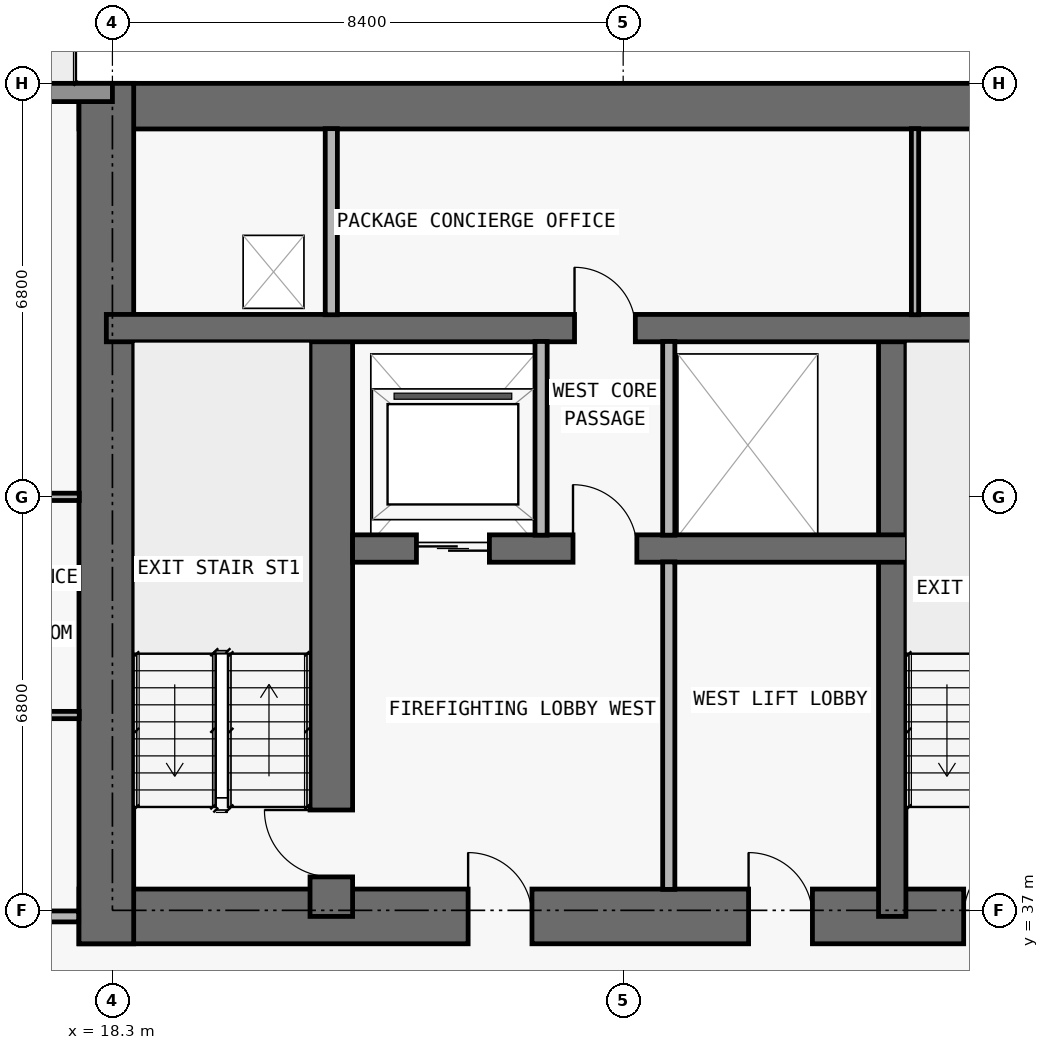
"""IFC4 building model, lengths in metres.
Left out: names, types, materials, properties, quantities, classifications, styles, units other than length and angle.
Written with IfcOpenShell. Run it as: python <this file> out.ifc"""

import sys

from ifc_helpers import new_model, si_unit, direction, frame, frame_2d, origin, place, context, subcontext, project, spatial, rectangle, extrude, element, fill, save


model = new_model("IFC4")
c1 = context("Model", 3, precision=1e-05, world=origin(), true_north=direction((0.0, 1.0)))
c2 = subcontext(c1, "Body", "Model", "MODEL_VIEW")
j1 = project(units=[si_unit("LENGTHUNIT", "METRE"), si_unit("PLANEANGLEUNIT", "RADIAN")], contexts=[c1])
p1 = place(None, origin())
s1 = spatial("IfcSite", under=j1, at=p1, CompositionType="ELEMENT")
p2 = place(p1, origin())
s2 = spatial("IfcBuilding", under=s1, at=p2, CompositionType="ELEMENT")
p3 = place(p2, frame((0.0, 0.0, 36.6)))
s3 = spatial("IfcBuildingStorey", under=s2, at=p3, CompositionType="ELEMENT", Elevation=36.6)
p4 = place(p3, frame((17.75, 36.9, 0.0), z_axis=(0.0, 0.0, 1.0), x_axis=(1.0, 0.0, 0.0)))
e1 = element("IfcWall", 1, at=p4, inside=s3, PredefinedType="SHEAR", context=c2, shape_type="SweptSolid", body=[
    extrude(rectangle(XDim=42.3, YDim=0.9, at=frame_2d((21.15, 0.0))), origin(), (0.0, 0.0, 1.0), 3.05),
])
p5 = place(p4, frame((14.55, 0.0, 0.0)))
e2 = element("IfcOpeningElement", 2, at=p5, cuts=e1, PredefinedType="OPENING", context=c2, shape_type="SweptSolid", body=[
    extrude(rectangle(XDim=1.1, YDim=2.15, at=frame_2d((0.55, 1.075))), frame((0.0, 0.46, 0.0), z_axis=(0.0, -1.0, 0.0), x_axis=(1.0, 0.0, 0.0)), (0.0, 0.0, 1.0), 0.92),
])
p6 = place(p4, frame((6.4, 0.0, 0.0)))
e3 = element("IfcOpeningElement", 3, at=p6, cuts=e1, PredefinedType="OPENING", context=c2, shape_type="SweptSolid", body=[
    extrude(rectangle(XDim=1.05, YDim=2.15, at=frame_2d((0.525, 1.075))), frame((0.0, 0.46, 0.0), z_axis=(0.0, -1.0, 0.0), x_axis=(1.0, 0.0, 0.0)), (0.0, 0.0, 1.0), 0.92),
])
p7 = place(p4, frame((34.9, 0.0, 0.0)))
e4 = element("IfcOpeningElement", 4, at=p7, cuts=e1, PredefinedType="OPENING", context=c2, shape_type="SweptSolid", body=[
    extrude(rectangle(XDim=1.05, YDim=2.15, at=frame_2d((0.525, 1.075))), frame((0.0, 0.46, 0.0), z_axis=(0.0, -1.0, 0.0), x_axis=(1.0, 0.0, 0.0)), (0.0, 0.0, 1.0), 0.92),
])
p8 = place(p4, frame((11.012, 0.0, 0.0)))
e5 = element("IfcOpeningElement", 5, at=p8, cuts=e1, PredefinedType="OPENING", context=c2, shape_type="SweptSolid", body=[
    extrude(rectangle(XDim=1.05, YDim=2.15, at=frame_2d((0.525, 1.075))), frame((0.0, 0.46, 0.0), z_axis=(0.0, -1.0, 0.0), x_axis=(1.0, 0.0, 0.0)), (0.0, 0.0, 1.0), 0.92),
])
p9 = place(p4, frame((24.25, 0.0, 0.0)))
e6 = element("IfcOpeningElement", 6, at=p9, cuts=e1, PredefinedType="OPENING", context=c2, shape_type="SweptSolid", body=[
    extrude(rectangle(XDim=1.05, YDim=2.15, at=frame_2d((0.525, 1.075))), frame((0.0, 0.46, 0.0), z_axis=(0.0, -1.0, 0.0), x_axis=(1.0, 0.0, 0.0)), (0.0, 0.0, 1.0), 0.92),
])
p10 = place(p3, frame((17.75, 50.225, 0.0), z_axis=(0.0, 0.0, 1.0), x_axis=(1.0, 0.0, 0.0)))
e7 = element("IfcWall", 7, at=p10, inside=s3, PredefinedType="SHEAR", context=c2, shape_type="SweptSolid", body=[
    extrude(rectangle(XDim=42.3, YDim=0.75, at=frame_2d((21.15, 0.0))), origin(), (0.0, 0.0, 1.0), 3.05),
])
p11 = place(p3, frame((18.2, 36.45, 0.0), z_axis=(0.0, 0.0, 1.0), x_axis=(0.0, 1.0, 0.0)))
e8 = element("IfcWall", 8, at=p11, inside=s3, PredefinedType="SHEAR", context=c2, shape_type="SweptSolid", body=[
    extrude(rectangle(XDim=14.15, YDim=0.9, at=frame_2d((7.075, 0.0))), origin(), (0.0, 0.0, 1.0), 3.05),
])
p12 = place(p3, frame((21.9, 36.9, 0.0), z_axis=(0.0, 0.0, 1.0), x_axis=(0.0, 1.0, 0.0)))
e9 = element("IfcWall", 9, at=p12, inside=s3, PredefinedType="SHEAR", context=c2, shape_type="SweptSolid", body=[
    extrude(rectangle(XDim=9.675, YDim=0.7, at=frame_2d((4.837, 0.0))), origin(), (0.0, 0.0, 1.0), 3.05),
])
p13 = place(p12, frame((0.65, 0.0, 0.0)))
e10 = element("IfcOpeningElement", 10, at=p13, cuts=e9, PredefinedType="OPENING", context=c2, shape_type="SweptSolid", body=[
    extrude(rectangle(XDim=1.1, YDim=2.15, at=frame_2d((0.55, 1.075))), frame((0.0, 0.36, 0.0), z_axis=(0.0, -1.0, 0.0), x_axis=(1.0, 0.0, 0.0)), (0.0, 0.0, 1.0), 0.72),
])
p14 = place(p3, frame((31.125, 36.9, 0.0), z_axis=(0.0, 0.0, 1.0), x_axis=(0.0, 1.0, 0.0)))
e11 = element("IfcWall", 11, at=p14, inside=s3, PredefinedType="SHEAR", context=c2, shape_type="SweptSolid", body=[
    extrude(rectangle(XDim=9.675, YDim=0.45, at=frame_2d((4.837, 0.0))), origin(), (0.0, 0.0, 1.0), 3.05),
])
p15 = place(p3, frame((22.25, 42.95, 0.0), z_axis=(0.0, 0.0, 1.0), x_axis=(1.0, 0.0, 0.0)))
e12 = element("IfcWall", 12, at=p15, inside=s3, PredefinedType="SHEAR", context=c2, shape_type="SweptSolid", body=[
    extrude(rectangle(XDim=33.3, YDim=0.45, at=frame_2d((16.65, 0.0))), origin(), (0.0, 0.0, 1.0), 3.05),
])
p16 = place(p15, frame((1.05, 0.0, 0.0)))
e13 = element("IfcOpeningElement", 13, at=p16, cuts=e12, PredefinedType="OPENING", context=c2, shape_type="SweptSolid", body=[
    extrude(rectangle(XDim=1.2, YDim=2.2, at=frame_2d((0.6, 1.1))), frame((0.0, 0.235, 0.0), z_axis=(0.0, -1.0, 0.0), x_axis=(1.0, 0.0, 0.0)), (0.0, 0.0, 1.0), 0.47),
])
p17 = place(p15, frame((31.05, 0.0, 0.0)))
e14 = element("IfcOpeningElement", 14, at=p17, cuts=e12, PredefinedType="OPENING", context=c2, shape_type="SweptSolid", body=[
    extrude(rectangle(XDim=1.2, YDim=2.2, at=frame_2d((0.6, 1.1))), frame((0.0, 0.235, 0.0), z_axis=(0.0, -1.0, 0.0), x_axis=(1.0, 0.0, 0.0)), (0.0, 0.0, 1.0), 0.47),
])
p18 = place(p15, frame((13.5, 0.0, 0.0)))
e15 = element("IfcOpeningElement", 15, at=p18, cuts=e12, PredefinedType="OPENING", context=c2, shape_type="SweptSolid", body=[
    extrude(rectangle(XDim=1.1, YDim=2.2, at=frame_2d((0.55, 1.1))), frame((0.0, 0.235, 0.0), z_axis=(0.0, -1.0, 0.0), x_axis=(1.0, 0.0, 0.0)), (0.0, 0.0, 1.0), 0.47),
])
p19 = place(p15, frame((16.1, 0.0, 0.0)))
e16 = element("IfcOpeningElement", 16, at=p19, cuts=e12, PredefinedType="OPENING", context=c2, shape_type="SweptSolid", body=[
    extrude(rectangle(XDim=1.1, YDim=2.2, at=frame_2d((0.55, 1.1))), frame((0.0, 0.235, 0.0), z_axis=(0.0, -1.0, 0.0), x_axis=(1.0, 0.0, 0.0)), (0.0, 0.0, 1.0), 0.47),
])
p20 = place(p15, frame((18.7, 0.0, 0.0)))
e17 = element("IfcOpeningElement", 17, at=p20, cuts=e12, PredefinedType="OPENING", context=c2, shape_type="SweptSolid", body=[
    extrude(rectangle(XDim=1.1, YDim=2.2, at=frame_2d((0.55, 1.1))), frame((0.0, 0.235, 0.0), z_axis=(0.0, -1.0, 0.0), x_axis=(1.0, 0.0, 0.0)), (0.0, 0.0, 1.0), 0.47),
])
p21 = place(p15, frame((3.625, 0.0, 0.0)))
e18 = element("IfcOpeningElement", 18, at=p21, cuts=e12, PredefinedType="OPENING", context=c2, shape_type="SweptSolid", body=[
    extrude(rectangle(XDim=1.05, YDim=2.15, at=frame_2d((0.525, 1.075))), frame((0.0, 0.235, 0.0), z_axis=(0.0, -1.0, 0.0), x_axis=(1.0, 0.0, 0.0)), (0.0, 0.0, 1.0), 0.47),
])
p22 = place(p15, frame((28.675, 0.0, 0.0)))
e19 = element("IfcOpeningElement", 19, at=p22, cuts=e12, PredefinedType="OPENING", context=c2, shape_type="SweptSolid", body=[
    extrude(rectangle(XDim=1.05, YDim=2.15, at=frame_2d((0.525, 1.075))), frame((0.0, 0.235, 0.0), z_axis=(0.0, -1.0, 0.0), x_axis=(1.0, 0.0, 0.0)), (0.0, 0.0, 1.0), 0.47),
])
p23 = place(p3, frame((18.2, 46.575, 0.0), z_axis=(0.0, 0.0, 1.0), x_axis=(1.0, 0.0, 0.0)))
e20 = element("IfcWall", 20, at=p23, inside=s3, PredefinedType="SHEAR", context=c2, shape_type="SweptSolid", body=[
    extrude(rectangle(XDim=41.4, YDim=0.45, at=frame_2d((20.7, 0.0))), origin(), (0.0, 0.0, 1.0), 3.05),
])
p24 = place(p23, frame((7.7, 0.0, 0.0)))
e21 = element("IfcOpeningElement", 21, at=p24, cuts=e20, PredefinedType="OPENING", context=c2, shape_type="SweptSolid", body=[
    extrude(rectangle(XDim=1.0, YDim=2.2, at=frame_2d((0.5, 1.1))), frame((0.0, 0.235, 0.0), z_axis=(0.0, -1.0, 0.0), x_axis=(1.0, 0.0, 0.0)), (0.0, 0.0, 1.0), 0.47),
])
p25 = place(p23, frame((32.725, 0.0, 0.0)))
e22 = element("IfcOpeningElement", 22, at=p25, cuts=e20, PredefinedType="OPENING", context=c2, shape_type="SweptSolid", body=[
    extrude(rectangle(XDim=1.05, YDim=2.15, at=frame_2d((0.525, 1.075))), frame((0.0, 0.235, 0.0), z_axis=(0.0, -1.0, 0.0), x_axis=(1.0, 0.0, 0.0)), (0.0, 0.0, 1.0), 0.47),
])
p26 = place(p3, frame((5.1, 50.45, 0.0), z_axis=(0.0, 0.0, 1.0), x_axis=(1.0, 0.0, 0.0)))
e23 = element("IfcWall", 23, at=p26, inside=s3, PredefinedType="STANDARD", context=c2, shape_type="SweptSolid", body=[
    extrude(rectangle(XDim=13.2, YDim=0.3, at=frame_2d((6.6, 0.0))), origin(), (0.0, 0.0, 1.0), 3.05),
])
p27 = place(p26, frame((5.6, 0.0, 0.0)))
e24 = element("IfcOpeningElement", 24, at=p27, cuts=e23, PredefinedType="OPENING", context=c2, shape_type="SweptSolid", body=[
    extrude(rectangle(XDim=2.0, YDim=2.3, at=frame_2d((1.0, 1.15))), frame((0.0, 0.16, 0.0), z_axis=(0.0, -1.0, 0.0), x_axis=(1.0, 0.0, 0.0)), (0.0, 0.0, 1.0), 0.32),
])
p28 = place(p3, frame((21.9, 46.795, 0.0), z_axis=(0.0, 0.0, 1.0), x_axis=(0.0, 1.0, 0.0)))
e25 = element("IfcWall", 25, at=p28, inside=s3, PredefinedType="PARTITIONING", context=c2, shape_type="SweptSolid", body=[
    extrude(rectangle(XDim=3.06, YDim=0.2, at=frame_2d((1.53, 0.0))), origin(), (0.0, 0.0, 1.0), 3.05),
])
p29 = place(p3, frame((25.35, 43.17, 0.0), z_axis=(0.0, 0.0, 1.0), x_axis=(0.0, 1.0, 0.0)))
e26 = element("IfcWall", 26, at=p29, inside=s3, PredefinedType="PARTITIONING", context=c2, shape_type="SweptSolid", body=[
    extrude(rectangle(XDim=3.185, YDim=0.2, at=frame_2d((1.593, 0.0))), origin(), (0.0, 0.0, 1.0), 3.05),
])
p30 = place(p3, frame((27.45, 37.345, 0.0), z_axis=(0.0, 0.0, 1.0), x_axis=(0.0, 1.0, 0.0)))
e27 = element("IfcWall", 27, at=p30, inside=s3, PredefinedType="PARTITIONING", context=c2, shape_type="SweptSolid", body=[
    extrude(rectangle(XDim=5.385, YDim=0.2, at=frame_2d((2.692, 0.0))), origin(), (0.0, 0.0, 1.0), 3.05),
])
p31 = place(p3, frame((27.45, 43.17, 0.0), z_axis=(0.0, 0.0, 1.0), x_axis=(0.0, 1.0, 0.0)))
e28 = element("IfcWall", 28, at=p31, inside=s3, PredefinedType="PARTITIONING", context=c2, shape_type="SweptSolid", body=[
    extrude(rectangle(XDim=3.185, YDim=0.2, at=frame_2d((1.593, 0.0))), origin(), (0.0, 0.0, 1.0), 3.05),
])
p32 = place(p3, frame((31.5, 46.795, 0.0), z_axis=(0.0, 0.0, 1.0), x_axis=(0.0, 1.0, 0.0)))
e29 = element("IfcWall", 29, at=p32, inside=s3, PredefinedType="PARTITIONING", context=c2, shape_type="SweptSolid", body=[
    extrude(rectangle(XDim=3.06, YDim=0.12, at=frame_2d((1.53, 0.0))), origin(), (0.0, 0.0, 1.0), 3.05),
])
p33 = place(p3, frame((5.1, 36.9, 0.0), z_axis=(0.0, 0.0, 1.0), x_axis=(1.0, 0.0, 0.0)))
e30 = element("IfcWall", 30, at=p33, inside=s3, PredefinedType="PARTITIONING", context=c2, shape_type="SweptSolid", body=[
    extrude(rectangle(XDim=12.645, YDim=0.18, at=frame_2d((6.323, 0.0))), origin(), (0.0, 0.0, 1.0), 3.05),
])
p34 = place(p33, frame((7.125, 0.0, 0.0)))
e31 = element("IfcOpeningElement", 31, at=p34, cuts=e30, PredefinedType="OPENING", context=c2, shape_type="SweptSolid", body=[
    extrude(rectangle(XDim=1.0, YDim=2.2, at=frame_2d((0.5, 1.1))), frame((0.0, 0.1, 0.0), z_axis=(0.0, -1.0, 0.0), x_axis=(1.0, 0.0, 0.0)), (0.0, 0.0, 1.0), 0.2),
])
p35 = place(p3, frame((15.55, 40.212, 0.0), z_axis=(0.0, 0.0, 1.0), x_axis=(1.0, 0.0, 0.0)))
e32 = element("IfcWall", 32, at=p35, inside=s3, PredefinedType="PARTITIONING", context=c2, shape_type="SweptSolid", body=[
    extrude(rectangle(XDim=2.205, YDim=0.12, at=frame_2d((1.103, 0.0))), origin(), (0.0, 0.0, 1.0), 3.05),
])
p36 = place(p3, frame((1.795, 43.8, 0.0), z_axis=(0.0, 0.0, 1.0), x_axis=(1.0, 0.0, 0.0)))
e33 = element("IfcWall", 33, at=p36, inside=s3, PredefinedType="PARTITIONING", context=c2, shape_type="SweptSolid", body=[
    extrude(rectangle(XDim=15.96, YDim=0.12, at=frame_2d((7.98, 0.0))), origin(), (0.0, 0.0, 1.0), 2.339),
])
p37 = place(p36, frame((5.255, 0.0, 0.0)))
e34 = element("IfcOpeningElement", 34, at=p37, cuts=e33, PredefinedType="OPENING", context=c2, shape_type="SweptSolid", body=[
    extrude(rectangle(XDim=0.9, YDim=2.15, at=frame_2d((0.45, 1.075))), frame((0.0, 0.07, 0.0), z_axis=(0.0, -1.0, 0.0), x_axis=(1.0, 0.0, 0.0)), (0.0, 0.0, 1.0), 0.14),
])
p38 = place(p36, frame((10.48, 0.0, 0.0)))
e35 = element("IfcOpeningElement", 35, at=p38, cuts=e33, PredefinedType="OPENING", context=c2, shape_type="SweptSolid", body=[
    extrude(rectangle(XDim=0.9, YDim=2.15, at=frame_2d((0.45, 1.075))), frame((0.0, 0.07, 0.0), z_axis=(0.0, -1.0, 0.0), x_axis=(1.0, 0.0, 0.0)), (0.0, 0.0, 1.0), 0.14),
])
p39 = place(p36, frame((14.433, 0.0, 0.0)))
e36 = element("IfcOpeningElement", 36, at=p39, cuts=e33, PredefinedType="OPENING", context=c2, shape_type="SweptSolid", body=[
    extrude(rectangle(XDim=0.85, YDim=2.1, at=frame_2d((0.425, 1.05))), frame((0.0, 0.07, 0.0), z_axis=(0.0, -1.0, 0.0), x_axis=(1.0, 0.0, 0.0)), (0.0, 0.0, 1.0), 0.14),
])
p40 = place(p16, origin())
e37 = element("IfcDoor", 37, at=p40, inside=s3, OperationType="DOUBLE_DOOR_SLIDING", PredefinedType="DOOR", context=c2, shape_type="SweptSolid", body=[
    extrude(rectangle(XDim=1.2, YDim=2.2, at=frame_2d((0.6, 1.1))), frame((0.0, 0.025, 0.0), z_axis=(0.0, -1.0, 0.0), x_axis=(1.0, 0.0, 0.0)), (0.0, 0.0, 1.0), 0.05),
])
fill(e13, e37)
p41 = place(p5, origin())
e38 = element("IfcDoor", 38, at=p41, inside=s3, OperationType="SINGLE_SWING_RIGHT", PredefinedType="DOOR", context=c2, shape_type="SweptSolid", body=[
    extrude(rectangle(XDim=1.1, YDim=2.15, at=frame_2d((0.55, 1.075))), frame((0.0, 0.025, 0.0), z_axis=(0.0, -1.0, 0.0), x_axis=(1.0, 0.0, 0.0)), (0.0, 0.0, 1.0), 0.05),
])
fill(e2, e38)
p42 = place(p6, origin())
e39 = element("IfcDoor", 39, at=p42, inside=s3, OperationType="SINGLE_SWING_LEFT", PredefinedType="DOOR", context=c2, shape_type="SweptSolid", body=[
    extrude(rectangle(XDim=1.05, YDim=2.15, at=frame_2d((0.525, 1.075))), frame((0.0, 0.025, 0.0), z_axis=(0.0, -1.0, 0.0), x_axis=(1.0, 0.0, 0.0)), (0.0, 0.0, 1.0), 0.05),
])
fill(e3, e39)
p43 = place(p13, origin())
e40 = element("IfcDoor", 40, at=p43, inside=s3, OperationType="SINGLE_SWING_RIGHT", PredefinedType="DOOR", context=c2, shape_type="SweptSolid", body=[
    extrude(rectangle(XDim=1.1, YDim=2.15, at=frame_2d((0.55, 1.075))), frame((0.0, 0.025, 0.0), z_axis=(0.0, -1.0, 0.0), x_axis=(1.0, 0.0, 0.0)), (0.0, 0.0, 1.0), 0.05),
])
fill(e10, e40)
p44 = place(p21, origin())
e41 = element("IfcDoor", 41, at=p44, inside=s3, OperationType="SINGLE_SWING_LEFT", PredefinedType="DOOR", context=c2, shape_type="SweptSolid", body=[
    extrude(rectangle(XDim=1.05, YDim=2.15, at=frame_2d((0.525, 1.075))), frame((0.0, 0.025, 0.0), z_axis=(0.0, -1.0, 0.0), x_axis=(1.0, 0.0, 0.0)), (0.0, 0.0, 1.0), 0.05),
])
fill(e18, e41)
p45 = place(p8, origin())
e42 = element("IfcDoor", 42, at=p45, inside=s3, OperationType="SINGLE_SWING_LEFT", PredefinedType="DOOR", context=c2, shape_type="SweptSolid", body=[
    extrude(rectangle(XDim=1.05, YDim=2.15, at=frame_2d((0.525, 1.075))), frame((0.0, 0.025, 0.0), z_axis=(0.0, -1.0, 0.0), x_axis=(1.0, 0.0, 0.0)), (0.0, 0.0, 1.0), 0.05),
])
fill(e5, e42)
p46 = place(p24, origin())
e43 = element("IfcDoor", 43, at=p46, inside=s3, OperationType="SINGLE_SWING_LEFT", PredefinedType="DOOR", context=c2, shape_type="SweptSolid", body=[
    extrude(rectangle(XDim=1.0, YDim=2.2, at=frame_2d((0.5, 1.1))), frame((0.0, 0.025, 0.0), z_axis=(0.0, -1.0, 0.0), x_axis=(1.0, 0.0, 0.0)), (0.0, 0.0, 1.0), 0.05),
])
fill(e21, e43)
save(model, sys.argv[1])
